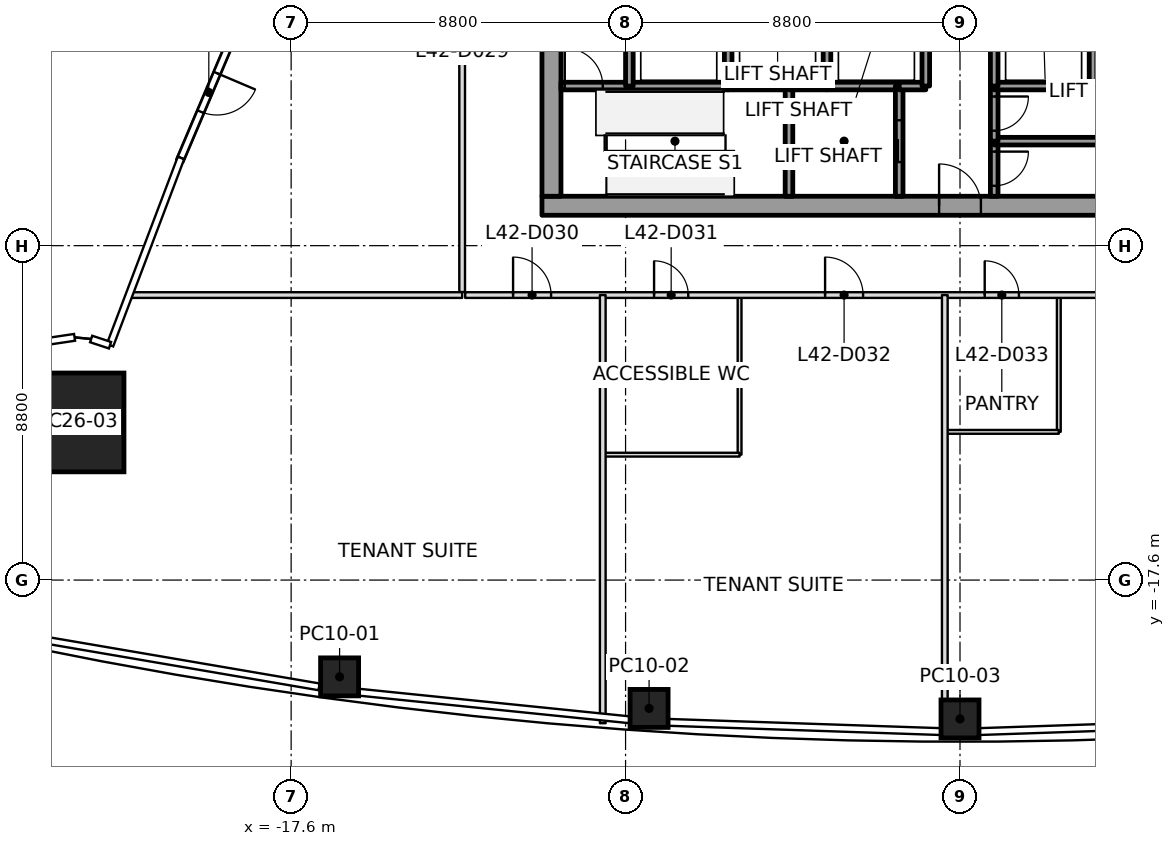
"""IFC4 building model, lengths in metres.
Left out: names, types, materials, properties, quantities, classifications, styles, units other than length and angle.
Written with IfcOpenShell. Run it as: python <this file> out.ifc"""

import sys

from ifc_helpers import new_model, si_unit, direction, frame, frame_2d, origin, origin_2d, place, context, subcontext, project, spatial, rectangle, extrude, element, fill, save


model = new_model("IFC4")
c1 = context("Model", 3, precision=1e-05, world=origin(), true_north=direction((0.0, 1.0)))
c2 = subcontext(c1, "Body", "Model", "MODEL_VIEW")
j1 = project(units=[si_unit("LENGTHUNIT", "METRE"), si_unit("PLANEANGLEUNIT", "RADIAN")], contexts=[c1])
p1 = place(None, origin())
s1 = spatial("IfcSite", under=j1, at=p1, CompositionType="ELEMENT")
p2 = place(p1, origin())
s2 = spatial("IfcBuilding", under=s1, at=p2, CompositionType="ELEMENT")
p3 = place(p2, frame((0.0, 0.0, 189.8)))
s3 = spatial("IfcBuildingStorey", under=s2, at=p3, CompositionType="ELEMENT", Elevation=189.8)
p4 = place(p3, frame((-23.299, -13.452, 0.0), z_axis=(0.02793953433, 0.016165887767, 0.999478887468), x_axis=(0.99960961501, -0.000451843769, -0.027935880437)))
e1 = element("IfcColumn", 1, at=p4, inside=s3, PredefinedType="COLUMN", context=c2, shape_type="SweptSolid", body=[
    extrude(rectangle(XDim=2.6, YDim=2.6, at=origin_2d()), origin(), (0.0, 0.0, 1.0), 4.002),
])
p5 = place(p3, frame((-16.325, -20.147, 0.0), z_axis=(0.017635456472, 0.010434820265, 0.999790030557), x_axis=(-0.990693907899, 0.135157378224, 0.016064369367)))
e2 = element("IfcColumn", 2, at=p5, inside=s3, PredefinedType="COLUMN", context=c2, shape_type="SweptSolid", body=[
    extrude(rectangle(XDim=1.0, YDim=1.0, at=origin_2d()), origin(), (0.0, 0.0, 1.0), 4.001),
])
p6 = place(p3, frame((-8.181, -20.977, 0.0), z_axis=(0.008788174922, 0.01116830563, 0.999899013366), x_axis=(-0.997670848566, 0.067739841795, 0.008011975778)))
e3 = element("IfcColumn", 3, at=p6, inside=s3, PredefinedType="COLUMN", context=c2, shape_type="SweptSolid", body=[
    extrude(rectangle(XDim=1.0, YDim=1.0, at=origin_2d()), origin(), (0.0, 0.0, 1.0), 4.0),
])
p7 = place(p3, frame((0.0, -21.254, 0.0), z_axis=(0.0, 0.011473854038, 0.99993417317), x_axis=(1.0, 0.0, 0.0)))
e4 = element("IfcColumn", 4, at=p7, inside=s3, PredefinedType="COLUMN", context=c2, shape_type="SweptSolid", body=[
    extrude(rectangle(XDim=1.0, YDim=1.0, at=origin_2d()), origin(), (0.0, 0.0, 1.0), 4.0),
])
p8 = place(p3, frame((-11.0, -7.75, 0.0), z_axis=(0.0, 0.0, 1.0), x_axis=(1.0, 0.0, 0.0)))
e5 = element("IfcWall", 5, at=p8, inside=s3, PredefinedType="SHEAR", context=c2, shape_type="SweptSolid", body=[
    extrude(rectangle(XDim=22.0, YDim=0.5, at=frame_2d((11.0, 0.0))), origin(), (0.0, 0.0, 1.0), 4.0),
])
p9 = place(p8, frame((10.45, 0.0, 0.0)))
e6 = element("IfcOpeningElement", 6, at=p9, cuts=e5, PredefinedType="OPENING", context=c2, shape_type="SweptSolid", body=[
    extrude(rectangle(XDim=1.1, YDim=2.1, at=frame_2d((0.55, 1.05))), frame((0.0, 0.25, 0.0), z_axis=(0.0, -1.0, 0.0), x_axis=(1.0, 0.0, 0.0)), (0.0, 0.0, 1.0), 0.5),
])
p10 = place(p3, frame((-10.75, -7.5, 0.0), z_axis=(0.0, 0.0, 1.0), x_axis=(0.0, 1.0, 0.0)))
e7 = element("IfcWall", 7, at=p10, inside=s3, PredefinedType="SHEAR", context=c2, shape_type="SweptSolid", body=[
    extrude(rectangle(XDim=15.0, YDim=0.5, at=frame_2d((7.5, 0.0))), origin(), (0.0, 0.0, 1.0), 4.0),
])
p11 = place(p10, frame((6.6, 0.0, 0.0)))
e8 = element("IfcOpeningElement", 8, at=p11, cuts=e7, PredefinedType="OPENING", context=c2, shape_type="SweptSolid", body=[
    extrude(rectangle(XDim=1.8, YDim=2.1, at=frame_2d((0.9, 1.05))), frame((0.0, 0.25, 0.0), z_axis=(0.0, -1.0, 0.0), x_axis=(1.0, 0.0, 0.0)), (0.0, 0.0, 1.0), 0.5),
])
p12 = place(p3, frame((-18.999, -2.961, 0.0), z_axis=(0.0, 0.0, 1.0), x_axis=(-0.391065585554, -0.920362813132, 0.0)))
e9 = element("IfcWall", 9, at=p12, inside=s3, PredefinedType="SOLIDWALL", context=c2, shape_type="SweptSolid", body=[
    extrude(rectangle(XDim=3.926, YDim=0.2, at=frame_2d((1.963, 0.0))), origin(), (0.0, 0.0, 1.0), 3.247),
])
p13 = place(p12, frame((1.413, 0.0, 0.0)))
e10 = element("IfcOpeningElement", 10, at=p13, cuts=e9, PredefinedType="OPENING", context=c2, shape_type="SweptSolid", body=[
    extrude(rectangle(XDim=1.1, YDim=2.1, at=frame_2d((0.55, 1.05))), frame((0.0, 0.1, 0.0), z_axis=(0.0, -1.0, 0.0), x_axis=(1.0, 0.0, 0.0)), (0.0, 0.0, 1.0), 0.2),
])
p14 = place(p3, frame((-10.5, -4.6, 0.0), z_axis=(0.0, 0.0, 1.0), x_axis=(1.0, 0.0, 0.0)))
e11 = element("IfcWall", 11, at=p14, inside=s3, PredefinedType="SOLIDWALL", context=c2, shape_type="SweptSolid", body=[
    extrude(rectangle(XDim=1.8, YDim=0.2, at=frame_2d((0.9, 0.0))), origin(), (0.0, 0.0, 1.0), 3.85),
])
p15 = place(p14, frame((0.1, 0.0, 0.0)))
e12 = element("IfcOpeningElement", 12, at=p15, cuts=e11, PredefinedType="OPENING", context=c2, shape_type="SweptSolid", body=[
    extrude(rectangle(XDim=1.0, YDim=2.1, at=frame_2d((0.5, 1.05))), frame((0.0, 0.1, 0.0), z_axis=(0.0, -1.0, 0.0), x_axis=(1.0, 0.0, 0.0)), (0.0, 0.0, 1.0), 0.2),
])
p16 = place(p3, frame((-8.7, -4.6, 0.0), z_axis=(0.0, 0.0, 1.0), x_axis=(1.0, 0.0, 0.0)))
e13 = element("IfcWall", 13, at=p16, inside=s3, PredefinedType="SOLIDWALL", context=c2, shape_type="SweptSolid", body=[
    extrude(rectangle(XDim=2.6, YDim=0.2, at=frame_2d((1.3, 0.0))), origin(), (0.0, 0.0, 1.0), 3.85),
])
p17 = place(p3, frame((-8.7, -4.6, 0.0), z_axis=(0.0, 0.0, 1.0), x_axis=(0.0, 1.0, 0.0)))
e14 = element("IfcWall", 14, at=p17, inside=s3, PredefinedType="SOLIDWALL", context=c2, shape_type="SweptSolid", body=[
    extrude(rectangle(XDim=2.8, YDim=0.2, at=frame_2d((1.4, 0.0))), origin(), (0.0, 0.0, 1.0), 3.85),
])
p18 = place(p3, frame((-6.1, -4.6, 0.0), z_axis=(0.0, 0.0, 1.0), x_axis=(1.0, 0.0, 0.0)))
e15 = element("IfcWall", 15, at=p18, inside=s3, PredefinedType="SOLIDWALL", context=c2, shape_type="SweptSolid", body=[
    extrude(rectangle(XDim=1.6, YDim=0.2, at=frame_2d((0.8, 0.0))), origin(), (0.0, 0.0, 1.0), 3.85),
])
p19 = place(p3, frame((-6.1, -4.6, 0.0), z_axis=(0.0, 0.0, 1.0), x_axis=(0.0, 1.0, 0.0)))
e16 = element("IfcWall", 16, at=p19, inside=s3, PredefinedType="SOLIDWALL", context=c2, shape_type="SweptSolid", body=[
    extrude(rectangle(XDim=2.8, YDim=0.2, at=frame_2d((1.4, 0.0))), origin(), (0.0, 0.0, 1.0), 3.85),
])
p20 = place(p3, frame((-4.5, -4.6, 0.0), z_axis=(0.0, 0.0, 1.0), x_axis=(0.0, -1.0, 0.0)))
e17 = element("IfcWall", 17, at=p20, inside=s3, PredefinedType="SOLIDWALL", context=c2, shape_type="SweptSolid", body=[
    extrude(rectangle(XDim=2.9, YDim=0.2, at=frame_2d((1.45, 0.0))), origin(), (0.0, 0.0, 1.0), 3.85),
])
p21 = place(p3, frame((-4.5, -4.6, 0.0), z_axis=(0.0, 0.0, 1.0), x_axis=(1.0, 0.0, 0.0)))
e18 = element("IfcWall", 18, at=p21, inside=s3, PredefinedType="SOLIDWALL", context=c2, shape_type="SweptSolid", body=[
    extrude(rectangle(XDim=1.0, YDim=0.2, at=frame_2d((0.5, 0.0))), origin(), (0.0, 0.0, 1.0), 3.85),
])
p22 = place(p3, frame((-3.5, -4.6, 0.0), z_axis=(0.0, 0.0, 1.0), x_axis=(1.0, 0.0, 0.0)))
e19 = element("IfcWall", 19, at=p22, inside=s3, PredefinedType="SOLIDWALL", context=c2, shape_type="SweptSolid", body=[
    extrude(rectangle(XDim=1.9, YDim=0.2, at=frame_2d((0.95, 0.0))), origin(), (0.0, 0.0, 1.0), 3.85),
])
p23 = place(p3, frame((-3.5, -4.6, 0.0), z_axis=(0.0, 0.0, 1.0), x_axis=(0.0, 1.0, 0.0)))
e20 = element("IfcWall", 20, at=p23, inside=s3, PredefinedType="SOLIDWALL", context=c2, shape_type="SweptSolid", body=[
    extrude(rectangle(XDim=2.8, YDim=0.2, at=frame_2d((1.4, 0.0))), origin(), (0.0, 0.0, 1.0), 3.85),
])
p24 = place(p3, frame((-1.6, -7.5, 0.0), z_axis=(0.0, 0.0, 1.0), x_axis=(0.0, 1.0, 0.0)))
e21 = element("IfcWall", 21, at=p24, inside=s3, PredefinedType="SOLIDWALL", context=c2, shape_type="SweptSolid", body=[
    extrude(rectangle(XDim=2.9, YDim=0.2, at=frame_2d((1.45, 0.0))), origin(), (0.0, 0.0, 1.0), 3.85),
])
p25 = place(p24, frame((0.9, 0.0, 0.0)))
e22 = element("IfcOpeningElement", 22, at=p25, cuts=e21, PredefinedType="OPENING", context=c2, shape_type="SweptSolid", body=[
    extrude(rectangle(XDim=1.1, YDim=2.1, at=frame_2d((0.55, 1.05))), frame((0.0, 0.1, 0.0), z_axis=(0.0, -1.0, 0.0), x_axis=(1.0, 0.0, 0.0)), (0.0, 0.0, 1.0), 0.2),
])
p26 = place(p3, frame((-1.6, -4.6, 0.0), z_axis=(0.0, 0.0, 1.0), x_axis=(1.0, 0.0, 0.0)))
e23 = element("IfcWall", 23, at=p26, inside=s3, PredefinedType="SOLIDWALL", context=c2, shape_type="SweptSolid", body=[
    extrude(rectangle(XDim=0.7, YDim=0.2, at=frame_2d((0.35, 0.0))), origin(), (0.0, 0.0, 1.0), 3.85),
])
p27 = place(p3, frame((-0.9, -4.6, 0.0), z_axis=(0.0, 0.0, 1.0), x_axis=(0.0, 1.0, 0.0)))
e24 = element("IfcWall", 24, at=p27, inside=s3, PredefinedType="SOLIDWALL", context=c2, shape_type="SweptSolid", body=[
    extrude(rectangle(XDim=2.8, YDim=0.2, at=frame_2d((1.4, 0.0))), origin(), (0.0, 0.0, 1.0), 3.85),
])
p28 = place(p3, frame((0.9, -6.05, 0.0), z_axis=(0.0, 0.0, 1.0), x_axis=(0.0, -1.0, 0.0)))
e25 = element("IfcWall", 25, at=p28, inside=s3, PredefinedType="SOLIDWALL", context=c2, shape_type="SweptSolid", body=[
    extrude(rectangle(XDim=1.45, YDim=0.2, at=frame_2d((0.725, 0.0))), origin(), (0.0, 0.0, 1.0), 3.85),
])
p29 = place(p28, frame((0.275, 0.0, 0.0)))
e26 = element("IfcOpeningElement", 26, at=p29, cuts=e25, PredefinedType="OPENING", context=c2, shape_type="SweptSolid", body=[
    extrude(rectangle(XDim=0.9, YDim=2.1, at=frame_2d((0.45, 1.05))), frame((0.0, 0.1, 0.0), z_axis=(0.0, -1.0, 0.0), x_axis=(1.0, 0.0, 0.0)), (0.0, 0.0, 1.0), 0.2),
])
p30 = place(p3, frame((4.5, -6.05, 0.0), z_axis=(0.0, 0.0, 1.0), x_axis=(-1.0, 0.0, 0.0)))
e27 = element("IfcWall", 27, at=p30, inside=s3, PredefinedType="SOLIDWALL", context=c2, shape_type="SweptSolid", body=[
    extrude(rectangle(XDim=3.6, YDim=0.2, at=frame_2d((1.8, 0.0))), origin(), (0.0, 0.0, 1.0), 3.85),
])
p31 = place(p3, frame((0.9, -4.6, 0.0), z_axis=(0.0, 0.0, 1.0), x_axis=(0.0, -1.0, 0.0)))
e28 = element("IfcWall", 28, at=p31, inside=s3, PredefinedType="SOLIDWALL", context=c2, shape_type="SweptSolid", body=[
    extrude(rectangle(XDim=1.45, YDim=0.2, at=frame_2d((0.725, 0.0))), origin(), (0.0, 0.0, 1.0), 3.85),
])
p32 = place(p31, frame((0.275, 0.0, 0.0)))
e29 = element("IfcOpeningElement", 29, at=p32, cuts=e28, PredefinedType="OPENING", context=c2, shape_type="SweptSolid", body=[
    extrude(rectangle(XDim=0.9, YDim=2.1, at=frame_2d((0.45, 1.05))), frame((0.0, 0.1, 0.0), z_axis=(0.0, -1.0, 0.0), x_axis=(1.0, 0.0, 0.0)), (0.0, 0.0, 1.0), 0.2),
])
p33 = place(p3, frame((3.5, -4.6, 0.0), z_axis=(0.0, 0.0, 1.0), x_axis=(-1.0, 0.0, 0.0)))
e30 = element("IfcWall", 30, at=p33, inside=s3, PredefinedType="SOLIDWALL", context=c2, shape_type="SweptSolid", body=[
    extrude(rectangle(XDim=2.6, YDim=0.2, at=frame_2d((1.3, 0.0))), origin(), (0.0, 0.0, 1.0), 3.85),
])
p34 = place(p3, frame((0.9, -1.8, 0.0), z_axis=(0.0, 0.0, 1.0), x_axis=(0.0, -1.0, 0.0)))
e31 = element("IfcWall", 31, at=p34, inside=s3, PredefinedType="SOLIDWALL", context=c2, shape_type="SweptSolid", body=[
    extrude(rectangle(XDim=2.8, YDim=0.2, at=frame_2d((1.4, 0.0))), origin(), (0.0, 0.0, 1.0), 3.85),
])
p35 = place(p3, frame((4.5, -4.6, 0.0), z_axis=(0.0, 0.0, 1.0), x_axis=(-1.0, 0.0, 0.0)))
e32 = element("IfcWall", 32, at=p35, inside=s3, PredefinedType="SOLIDWALL", context=c2, shape_type="SweptSolid", body=[
    extrude(rectangle(XDim=1.0, YDim=0.2, at=frame_2d((0.5, 0.0))), origin(), (0.0, 0.0, 1.0), 3.85),
])
p36 = place(p3, frame((3.5, -4.6, 0.0), z_axis=(0.0, 0.0, 1.0), x_axis=(0.0, 1.0, 0.0)))
e33 = element("IfcWall", 33, at=p36, inside=s3, PredefinedType="SOLIDWALL", context=c2, shape_type="SweptSolid", body=[
    extrude(rectangle(XDim=2.8, YDim=0.2, at=frame_2d((1.4, 0.0))), origin(), (0.0, 0.0, 1.0), 3.85),
])
p37 = place(p3, frame((-13.1, -10.1, 0.0), z_axis=(0.0, 0.0, 1.0), x_axis=(-1.0, 0.0, 0.0)))
e34 = element("IfcWall", 34, at=p37, inside=s3, PredefinedType="PARTITIONING", context=c2, shape_type="SweptSolid", body=[
    extrude(rectangle(XDim=8.792, YDim=0.15, at=frame_2d((4.396, 0.0))), origin(), (0.0, 0.0, 1.0), 3.166),
])
p38 = place(p3, frame((-9.4, -10.1, 0.0), z_axis=(0.0, 0.0, 1.0), x_axis=(0.0, -1.0, 0.0)))
e35 = element("IfcWall", 35, at=p38, inside=s3, PredefinedType="PARTITIONING", context=c2, shape_type="SweptSolid", body=[
    extrude(rectangle(XDim=11.267, YDim=0.15, at=frame_2d((5.633, 0.0))), origin(), (0.0, 0.0, 1.0), 3.234),
])
p39 = place(p3, frame((-0.4, -10.1, 0.0), z_axis=(0.0, 0.0, 1.0), x_axis=(0.0, -1.0, 0.0)))
e36 = element("IfcWall", 36, at=p39, inside=s3, PredefinedType="PARTITIONING", context=c2, shape_type="SweptSolid", body=[
    extrude(rectangle(XDim=11.63, YDim=0.15, at=frame_2d((5.815, 0.0))), origin(), (0.0, 0.0, 1.0), 3.234),
])
p40 = place(p3, frame((-13.1, 8.511, 0.0), z_axis=(0.0, 0.0, 1.0), x_axis=(0.0, -1.0, 0.0)))
e37 = element("IfcWall", 37, at=p40, inside=s3, PredefinedType="PARTITIONING", context=c2, shape_type="SweptSolid", body=[
    extrude(rectangle(XDim=18.531, YDim=0.15, at=frame_2d((9.265, 0.0))), origin(), (0.0, 0.0, 1.0), 3.166),
])
p41 = place(p40, frame((8.805, 0.0, 0.0)))
e38 = element("IfcOpeningElement", 38, at=p41, cuts=e37, PredefinedType="OPENING", context=c2, shape_type="SweptSolid", body=[
    extrude(rectangle(XDim=1.0, YDim=2.1, at=frame_2d((0.5, 1.05))), frame((0.0, 0.075, 0.0), z_axis=(0.0, -1.0, 0.0), x_axis=(1.0, 0.0, 0.0)), (0.0, 0.0, 1.0), 0.15),
])
p42 = place(p3, frame((-13.02, -10.1, 0.0), z_axis=(0.0, 0.0, 1.0), x_axis=(1.0, 0.0, 0.0)))
e39 = element("IfcWall", 39, at=p42, inside=s3, PredefinedType="PARTITIONING", context=c2, shape_type="SweptSolid", body=[
    extrude(rectangle(XDim=26.04, YDim=0.15, at=frame_2d((13.02, 0.0))), origin(), (0.0, 0.0, 1.0), 3.317),
])
p43 = place(p42, frame((1.26, 0.0, 0.0)))
e40 = element("IfcOpeningElement", 40, at=p43, cuts=e39, PredefinedType="OPENING", context=c2, shape_type="SweptSolid", body=[
    extrude(rectangle(XDim=1.0, YDim=2.1, at=frame_2d((0.5, 1.05))), frame((0.0, 0.075, 0.0), z_axis=(0.0, -1.0, 0.0), x_axis=(1.0, 0.0, 0.0)), (0.0, 0.0, 1.0), 0.15),
])
p44 = place(p42, frame((4.97, 0.0, 0.0)))
e41 = element("IfcOpeningElement", 41, at=p44, cuts=e39, PredefinedType="OPENING", context=c2, shape_type="SweptSolid", body=[
    extrude(rectangle(XDim=0.9, YDim=2.1, at=frame_2d((0.45, 1.05))), frame((0.0, 0.075, 0.0), z_axis=(0.0, -1.0, 0.0), x_axis=(1.0, 0.0, 0.0)), (0.0, 0.0, 1.0), 0.15),
])
p45 = place(p42, frame((9.47, 0.0, 0.0)))
e42 = element("IfcOpeningElement", 42, at=p45, cuts=e39, PredefinedType="OPENING", context=c2, shape_type="SweptSolid", body=[
    extrude(rectangle(XDim=1.0, YDim=2.1, at=frame_2d((0.5, 1.05))), frame((0.0, 0.075, 0.0), z_axis=(0.0, -1.0, 0.0), x_axis=(1.0, 0.0, 0.0)), (0.0, 0.0, 1.0), 0.15),
])
p46 = place(p42, frame((13.67, 0.0, 0.0)))
e43 = element("IfcOpeningElement", 43, at=p46, cuts=e39, PredefinedType="OPENING", context=c2, shape_type="SweptSolid", body=[
    extrude(rectangle(XDim=0.9, YDim=2.1, at=frame_2d((0.45, 1.05))), frame((0.0, 0.075, 0.0), z_axis=(0.0, -1.0, 0.0), x_axis=(1.0, 0.0, 0.0)), (0.0, 0.0, 1.0), 0.15),
])
p47 = place(p42, frame((20.42, 0.0, 0.0)))
e44 = element("IfcOpeningElement", 44, at=p47, cuts=e39, PredefinedType="OPENING", context=c2, shape_type="SweptSolid", body=[
    extrude(rectangle(XDim=1.0, YDim=2.1, at=frame_2d((0.5, 1.05))), frame((0.0, 0.075, 0.0), z_axis=(0.0, -1.0, 0.0), x_axis=(1.0, 0.0, 0.0)), (0.0, 0.0, 1.0), 0.15),
])
p48 = place(p3, frame((-5.8, -10.13, 0.0), z_axis=(0.0, 0.0, 1.0), x_axis=(0.0, -1.0, 0.0)))
e45 = element("IfcWall", 45, at=p48, inside=s3, PredefinedType="PARTITIONING", context=c2, shape_type="SweptSolid", body=[
    extrude(rectangle(XDim=4.17, YDim=0.1, at=frame_2d((2.085, 0.0))), origin(), (0.0, 0.0, 1.0), 3.45),
])
p49 = place(p3, frame((-5.8, -14.3, 0.0), z_axis=(0.0, 0.0, 1.0), x_axis=(-1.0, 0.0, 0.0)))
e46 = element("IfcWall", 46, at=p49, inside=s3, PredefinedType="PARTITIONING", context=c2, shape_type="SweptSolid", body=[
    extrude(rectangle(XDim=3.57, YDim=0.1, at=frame_2d((1.785, 0.0))), origin(), (0.0, 0.0, 1.0), 3.317),
])
p50 = place(p3, frame((2.6, -10.13, 0.0), z_axis=(0.0, 0.0, 1.0), x_axis=(0.0, -1.0, 0.0)))
e47 = element("IfcWall", 47, at=p50, inside=s3, PredefinedType="PARTITIONING", context=c2, shape_type="SweptSolid", body=[
    extrude(rectangle(XDim=3.57, YDim=0.1, at=frame_2d((1.785, 0.0))), origin(), (0.0, 0.0, 1.0), 3.45),
])
p51 = place(p3, frame((2.6, -13.7, 0.0), z_axis=(0.0, 0.0, 1.0), x_axis=(-1.0, 0.0, 0.0)))
e48 = element("IfcWall", 48, at=p51, inside=s3, PredefinedType="PARTITIONING", context=c2, shape_type="SweptSolid", body=[
    extrude(rectangle(XDim=2.97, YDim=0.1, at=frame_2d((1.485, 0.0))), origin(), (0.0, 0.0, 1.0), 3.45),
])
p52 = place(p13, origin())
e49 = element("IfcDoor", 49, at=p52, inside=s3, OperationType="SINGLE_SWING_RIGHT", PredefinedType="DOOR", context=c2, shape_type="SweptSolid", body=[
    extrude(rectangle(XDim=1.1, YDim=2.1, at=frame_2d((0.55, 1.05))), frame((0.0, 0.025, 0.0), z_axis=(0.0, -1.0, 0.0), x_axis=(1.0, 0.0, 0.0)), (0.0, 0.0, 1.0), 0.05),
])
fill(e10, e49)
p53 = place(p43, origin())
e50 = element("IfcDoor", 50, at=p53, inside=s3, OperationType="SINGLE_SWING_RIGHT", PredefinedType="DOOR", context=c2, shape_type="SweptSolid", body=[
    extrude(rectangle(XDim=1.0, YDim=2.1, at=frame_2d((0.5, 1.05))), frame((0.0, 0.025, 0.0), z_axis=(0.0, -1.0, 0.0), x_axis=(1.0, 0.0, 0.0)), (0.0, 0.0, 1.0), 0.05),
])
fill(e40, e50)
p54 = place(p44, origin())
e51 = element("IfcDoor", 51, at=p54, inside=s3, OperationType="SINGLE_SWING_LEFT", PredefinedType="DOOR", context=c2, shape_type="SweptSolid", body=[
    extrude(rectangle(XDim=0.9, YDim=2.1, at=frame_2d((0.45, 1.05))), frame((0.0, 0.025, 0.0), z_axis=(0.0, -1.0, 0.0), x_axis=(1.0, 0.0, 0.0)), (0.0, 0.0, 1.0), 0.05),
])
fill(e41, e51)
p55 = place(p45, origin())
e52 = element("IfcDoor", 52, at=p55, inside=s3, OperationType="SINGLE_SWING_LEFT", PredefinedType="DOOR", context=c2, shape_type="SweptSolid", body=[
    extrude(rectangle(XDim=1.0, YDim=2.1, at=frame_2d((0.5, 1.05))), frame((0.0, 0.025, 0.0), z_axis=(0.0, -1.0, 0.0), x_axis=(1.0, 0.0, 0.0)), (0.0, 0.0, 1.0), 0.05),
])
fill(e42, e52)
p56 = place(p46, origin())
e53 = element("IfcDoor", 53, at=p56, inside=s3, OperationType="SINGLE_SWING_RIGHT", PredefinedType="DOOR", context=c2, shape_type="SweptSolid", body=[
    extrude(rectangle(XDim=0.9, YDim=2.1, at=frame_2d((0.45, 1.05))), frame((0.0, 0.025, 0.0), z_axis=(0.0, -1.0, 0.0), x_axis=(1.0, 0.0, 0.0)), (0.0, 0.0, 1.0), 0.05),
])
fill(e43, e53)
p57 = place(p25, origin())
e54 = element("IfcDoor", 54, at=p57, inside=s3, OperationType="SLIDING_TO_RIGHT", PredefinedType="DOOR", context=c2, shape_type="SweptSolid", body=[
    extrude(rectangle(XDim=1.1, YDim=2.1, at=frame_2d((0.55, 1.05))), frame((0.0, 0.025, 0.0), z_axis=(0.0, -1.0, 0.0), x_axis=(1.0, 0.0, 0.0)), (0.0, 0.0, 1.0), 0.05),
])
fill(e22, e54)
p58 = place(p15, origin())
e55 = element("IfcDoor", 55, at=p58, inside=s3, OperationType="SINGLE_SWING_LEFT", PredefinedType="DOOR", context=c2, shape_type="SweptSolid", body=[
    extrude(rectangle(XDim=1.0, YDim=2.1, at=frame_2d((0.5, 1.05))), frame((0.0, 0.025, 0.0), z_axis=(0.0, -1.0, 0.0), x_axis=(1.0, 0.0, 0.0)), (0.0, 0.0, 1.0), 0.05),
])
fill(e12, e55)
p59 = place(p29, origin())
e56 = element("IfcDoor", 56, at=p59, inside=s3, OperationType="SINGLE_SWING_LEFT", PredefinedType="DOOR", context=c2, shape_type="SweptSolid", body=[
    extrude(rectangle(XDim=0.9, YDim=2.1, at=frame_2d((0.45, 1.05))), frame((0.0, 0.025, 0.0), z_axis=(0.0, -1.0, 0.0), x_axis=(1.0, 0.0, 0.0)), (0.0, 0.0, 1.0), 0.05),
])
fill(e26, e56)
p60 = place(p32, origin())
e57 = element("IfcDoor", 57, at=p60, inside=s3, OperationType="SINGLE_SWING_RIGHT", PredefinedType="DOOR", context=c2, shape_type="SweptSolid", body=[
    extrude(rectangle(XDim=0.9, YDim=2.1, at=frame_2d((0.45, 1.05))), frame((0.0, 0.025, 0.0), z_axis=(0.0, -1.0, 0.0), x_axis=(1.0, 0.0, 0.0)), (0.0, 0.0, 1.0), 0.05),
])
fill(e29, e57)
p61 = place(p9, origin())
e58 = element("IfcDoor", 58, at=p61, inside=s3, OperationType="SINGLE_SWING_RIGHT", PredefinedType="DOOR", context=c2, shape_type="SweptSolid", body=[
    extrude(rectangle(XDim=1.1, YDim=2.1, at=frame_2d((0.55, 1.05))), frame((0.0, 0.025, 0.0), z_axis=(0.0, -1.0, 0.0), x_axis=(1.0, 0.0, 0.0)), (0.0, 0.0, 1.0), 0.05),
])
fill(e6, e58)
save(model, sys.argv[1])
